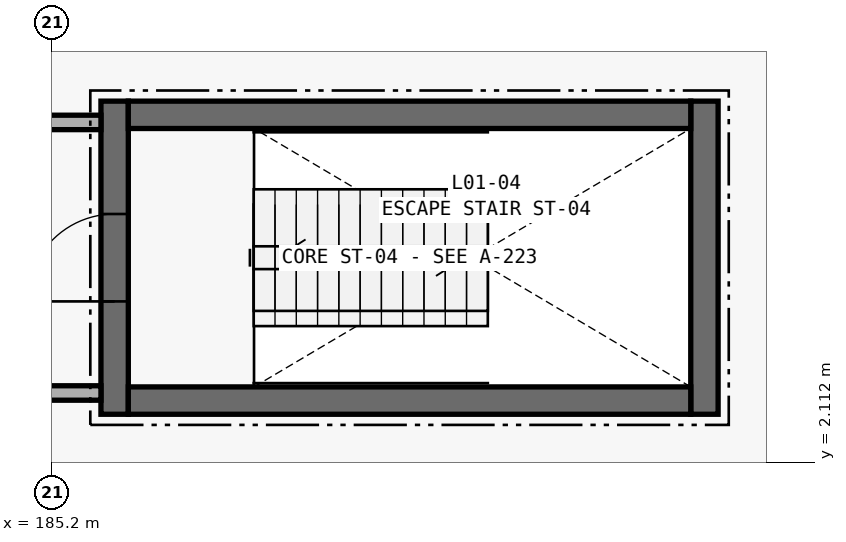
"""IFC4 building model, lengths in metres.
Left out: names, types, materials, properties, quantities, classifications, styles, units other than length and angle.
Written with IfcOpenShell. Run it as: python <this file> out.ifc"""

import sys

from ifc_helpers import new_model, si_unit, direction, frame, frame_2d, origin, place, context, subcontext, project, spatial, rectangle, extrude, element, fill, save


model = new_model("IFC4")
c1 = context("Model", 3, precision=1e-05, world=origin(), true_north=direction((0.0, 1.0)))
c2 = subcontext(c1, "Body", "Model", "MODEL_VIEW")
j1 = project(units=[si_unit("LENGTHUNIT", "METRE"), si_unit("PLANEANGLEUNIT", "RADIAN")], contexts=[c1])
p1 = place(None, origin())
s1 = spatial("IfcSite", under=j1, at=p1, CompositionType="ELEMENT")
p2 = place(p1, origin())
s2 = spatial("IfcBuilding", under=s1, at=p2, CompositionType="ELEMENT")
p3 = place(p2, frame((0.0, 0.0, 4.8)))
s3 = spatial("IfcBuildingStorey", under=s2, at=p3, CompositionType="ELEMENT", Elevation=4.8)
p4 = place(p3, frame((186.02, 2.74, 0.0), z_axis=(0.0, 0.0, 1.0), x_axis=(0.0, 1.0, 0.0)))
e1 = element("IfcWall", 1, at=p4, inside=s3, PredefinedType="SHEAR", context=c2, shape_type="SweptSolid", body=[
    extrude(rectangle(XDim=4.12, YDim=0.36, at=frame_2d((2.06, 0.0))), origin(), (0.0, 0.0, 1.0), 3.88),
])
p5 = place(p4, frame((1.485, 0.0, 0.0)))
e2 = element("IfcOpeningElement", 2, at=p5, cuts=e1, PredefinedType="OPENING", context=c2, shape_type="SweptSolid", body=[
    extrude(rectangle(XDim=1.15, YDim=2.15, at=frame_2d((0.575, 1.075))), frame((0.0, 0.195, 0.0), z_axis=(0.0, -1.0, 0.0), x_axis=(1.0, 0.0, 0.0)), (0.0, 0.0, 1.0), 0.39),
])
p6 = place(p3, frame((193.78, 2.74, 0.0), z_axis=(0.0, 0.0, 1.0), x_axis=(0.0, 1.0, 0.0)))
e3 = element("IfcWall", 3, at=p6, inside=s3, PredefinedType="SHEAR", context=c2, shape_type="SweptSolid", body=[
    extrude(rectangle(XDim=4.12, YDim=0.36, at=frame_2d((2.06, 0.0))), origin(), (0.0, 0.0, 1.0), 3.88),
])
for number, where, z_axis, x_axis in (
    (4, (186.2, 6.68, 0.0), (0.0, 0.0, 1.0), (1.0, 0.0, 0.0)),
    (5, (186.2, 2.92, 0.0), (0.0, 0.0, 1.0), (1.0, 0.0, 0.0)),
):
    element("IfcWall", number, at=place(p3, frame(where, z_axis=z_axis, x_axis=x_axis)), inside=s3, PredefinedType="SHEAR", context=c2, shape_type="SweptSolid", body=[
        extrude(rectangle(XDim=7.4, YDim=0.36, at=frame_2d((3.7, 0.0))), origin(), (0.0, 0.0, 1.0), 3.88),
    ])
p7 = place(p3, frame((181.825, 3.02, 0.0), z_axis=(0.0, 0.0, 1.0), x_axis=(1.0, 0.0, 0.0)))
e6 = element("IfcWall", 6, at=p7, inside=s3, PredefinedType="PARTITIONING", context=c2, shape_type="SweptSolid", body=[
    extrude(rectangle(XDim=4.015, YDim=0.19, at=frame_2d((2.008, 0.0))), origin(), (0.0, 0.0, 1.0), 2.76),
])
p8 = place(p3, frame((184.685, 6.58, 0.0), z_axis=(0.0, 0.0, 1.0), x_axis=(1.0, 0.0, 0.0)))
e7 = element("IfcWall", 7, at=p8, inside=s3, PredefinedType="PARTITIONING", context=c2, shape_type="SweptSolid", body=[
    extrude(rectangle(XDim=1.155, YDim=0.19, at=frame_2d((0.578, 0.0))), origin(), (0.0, 0.0, 1.0), 2.76),
])
p9 = place(p5, origin())
e8 = element("IfcDoor", 8, at=p9, inside=s3, OperationType="SINGLE_SWING_LEFT", PredefinedType="DOOR", context=c2, shape_type="SweptSolid", body=[
    extrude(rectangle(XDim=1.15, YDim=2.15, at=frame_2d((0.575, 1.075))), frame((0.0, 0.025, 0.0), z_axis=(0.0, -1.0, 0.0), x_axis=(1.0, 0.0, 0.0)), (0.0, 0.0, 1.0), 0.05),
])
fill(e2, e8)
save(model, sys.argv[1])
